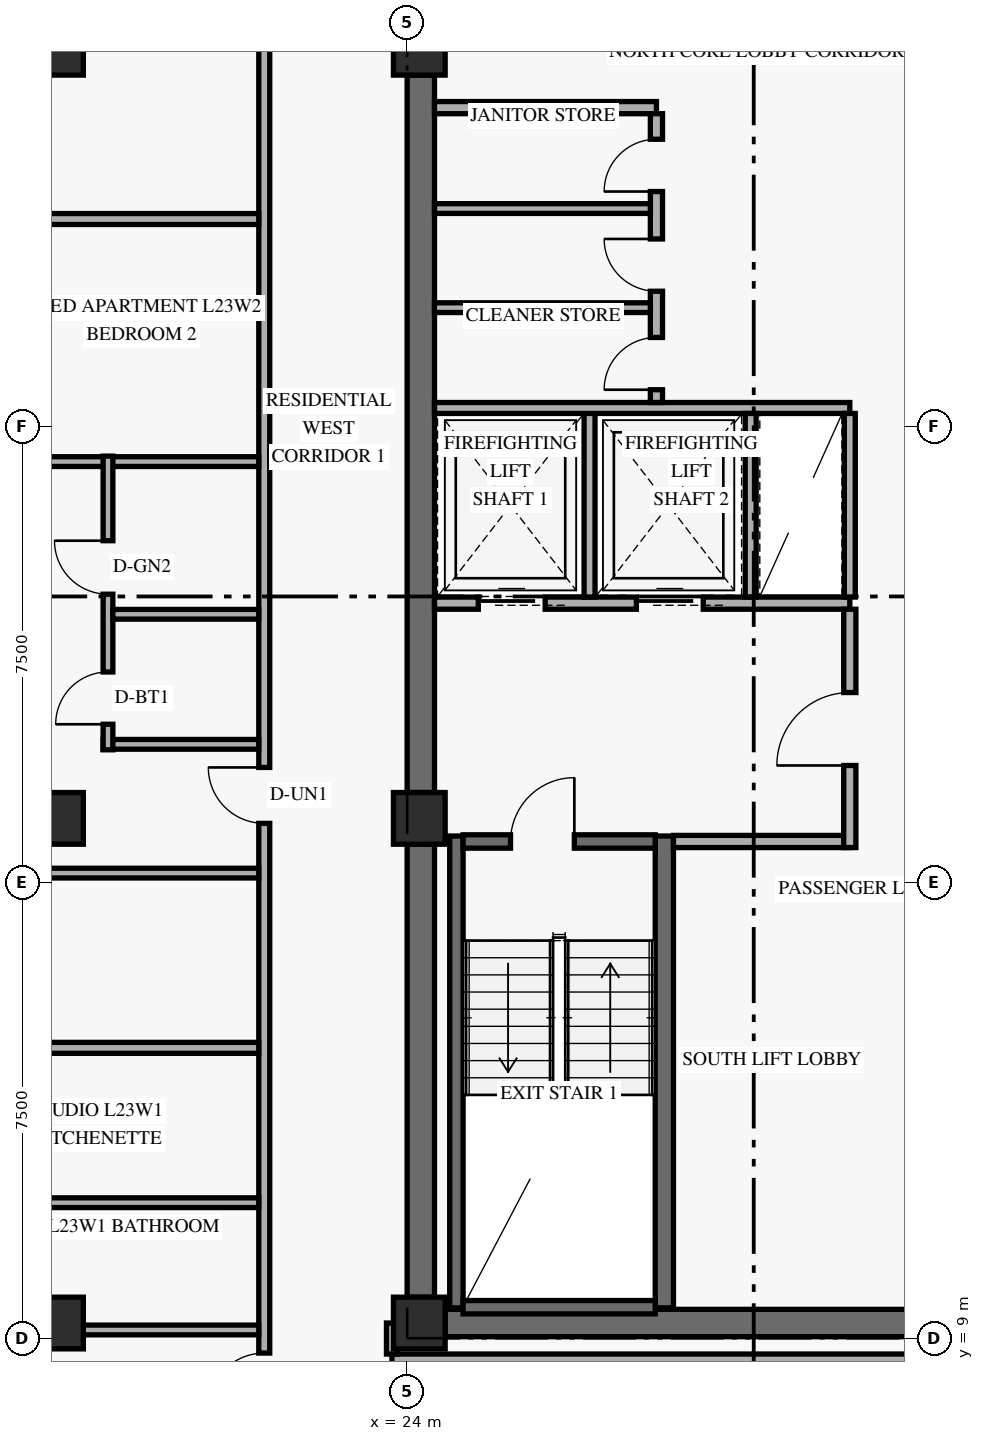
"""IFC4 building model, lengths in metres.
Left out: names, types, materials, properties, quantities, classifications, styles, units other than length and angle.
Written with IfcOpenShell. Run it as: python <this file> out.ifc"""

import sys

from ifc_helpers import new_model, si_unit, direction, frame, frame_2d, origin, origin_2d, place, context, subcontext, project, spatial, rectangle, extrude, element, fill, save


model = new_model("IFC4")
c1 = context("Model", 3, precision=1e-05, world=origin(), true_north=direction((0.0, 1.0)))
c2 = subcontext(c1, "Body", "Model", "MODEL_VIEW")
j1 = project(units=[si_unit("LENGTHUNIT", "METRE"), si_unit("PLANEANGLEUNIT", "RADIAN")], contexts=[c1])
p1 = place(None, origin())
s1 = spatial("IfcSite", under=j1, at=p1, CompositionType="ELEMENT")
p2 = place(p1, origin())
s2 = spatial("IfcBuilding", under=s1, at=p2, CompositionType="ELEMENT")
p3 = place(p2, frame((0.0, 0.0, 91.2)))
s3 = spatial("IfcBuildingStorey", under=s2, at=p3, CompositionType="ELEMENT", Elevation=91.2)
p4 = place(p3, frame((24.225, 9.675, 0.0), z_axis=(0.0, 0.0, 1.0), x_axis=(0.0, 1.0, 0.0)))
e1 = element("IfcWall", 1, at=p4, inside=s3, PredefinedType="SHEAR", context=c2, shape_type="SweptSolid", body=[
    extrude(rectangle(XDim=7.45, YDim=0.45, at=frame_2d((3.725, 0.0))), origin(), (0.0, 0.0, 1.0), 2.749),
])
p5 = place(p3, frame((24.225, 17.975, 0.0), z_axis=(0.0, 0.0, 1.0), x_axis=(0.0, 1.0, 0.0)))
e2 = element("IfcWall", 2, at=p5, inside=s3, PredefinedType="SHEAR", context=c2, shape_type="SweptSolid", body=[
    extrude(rectangle(XDim=11.8, YDim=0.45, at=frame_2d((5.9, 0.0))), origin(), (0.0, 0.0, 1.0), 2.749),
])
p6 = place(p3, frame((24.625, 9.25, 0.0), z_axis=(0.0, 0.0, 1.0), x_axis=(1.0, 0.0, 0.0)))
e3 = element("IfcWall", 3, at=p6, inside=s3, PredefinedType="SHEAR", context=c2, shape_type="SweptSolid", body=[
    extrude(rectangle(XDim=10.15, YDim=0.45, at=frame_2d((5.075, 0.0))), origin(), (0.0, 0.0, 1.0), 3.36),
])
p7 = place(p3, frame((24.81, 9.5, 0.0), z_axis=(0.0, 0.0, 1.0), x_axis=(0.0, 1.0, 0.0)))
e4 = element("IfcWall", 4, at=p7, inside=s3, PredefinedType="SHEAR", context=c2, shape_type="SweptSolid", body=[
    extrude(rectangle(XDim=7.76, YDim=0.22, at=frame_2d((3.88, 0.0))), origin(), (0.0, 0.0, 1.0), 3.36),
])
p8 = place(p3, frame((28.23, 9.5, 0.0), z_axis=(0.0, 0.0, 1.0), x_axis=(0.0, 1.0, 0.0)))
e5 = element("IfcWall", 5, at=p8, inside=s3, PredefinedType="SHEAR", context=c2, shape_type="SweptSolid", body=[
    extrude(rectangle(XDim=7.76, YDim=0.3, at=frame_2d((3.88, 0.0))), origin(), (0.0, 0.0, 1.0), 3.36),
])
p9 = place(p3, frame((24.92, 9.51, 0.0), z_axis=(0.0, 0.0, 1.0), x_axis=(1.0, 0.0, 0.0)))
e6 = element("IfcWall", 6, at=p9, inside=s3, PredefinedType="SHEAR", context=c2, shape_type="SweptSolid", body=[
    extrude(rectangle(XDim=3.16, YDim=0.22, at=frame_2d((1.58, 0.0))), origin(), (0.0, 0.0, 1.0), 3.36),
])
p10 = place(p3, frame((24.92, 17.17, 0.0), z_axis=(0.0, 0.0, 1.0), x_axis=(1.0, 0.0, 0.0)))
e7 = element("IfcWall", 7, at=p10, inside=s3, PredefinedType="SHEAR", context=c2, shape_type="SweptSolid", body=[
    extrude(rectangle(XDim=3.16, YDim=0.22, at=frame_2d((1.58, 0.0))), origin(), (0.0, 0.0, 1.0), 3.36),
])
p11 = place(p10, frame((0.78, 0.0, 0.0)))
e8 = element("IfcOpeningElement", 8, at=p11, cuts=e7, PredefinedType="OPENING", context=c2, shape_type="SweptSolid", body=[
    extrude(rectangle(XDim=1.05, YDim=2.15, at=frame_2d((0.525, 1.075))), frame((0.0, 0.12, 0.0), z_axis=(0.0, -1.0, 0.0), x_axis=(1.0, 0.0, 0.0)), (0.0, 0.0, 1.0), 0.24),
])
for number, where, z_axis, x_axis in (
    (9, (18.25, 9.25, 0.0), (0.0, 0.0, 1.0), (1.0, 0.0, 0.0)),
    (10, (18.25, 17.55, 0.0), (0.0, 0.0, 1.0), (1.0, 0.0, 0.0)),
    (11, (18.25, 30.2, 0.0), (0.0, 0.0, 1.0), (1.0, 0.0, 0.0)),
    (12, (24.2, 9.25, 0.0), (0.0, 0.0, 1.0), (1.0, 0.0, 0.0)),
    (13, (24.2, 17.55, 0.0), (0.0, 0.0, 1.0), (1.0, 0.0, 0.0)),
    (14, (24.2, 30.2, 0.0), (0.0, 0.0, 1.0), (1.0, 0.0, 0.0)),
):
    element("IfcColumn", number, at=place(p3, frame(where, z_axis=z_axis, x_axis=x_axis)), inside=s3, PredefinedType="COLUMN", context=c2, shape_type="SweptSolid", body=[
        extrude(rectangle(XDim=0.85, YDim=0.85, at=origin_2d()), origin(), (0.0, 0.0, 1.0), 3.6),
    ])
p12 = place(p3, frame((24.45, 21.09, 0.0), z_axis=(0.0, 0.0, 1.0), x_axis=(1.0, 0.0, 0.0)))
e15 = element("IfcWall", 15, at=p12, inside=s3, PredefinedType="STANDARD", context=c2, shape_type="SweptSolid", body=[
    extrude(rectangle(XDim=6.83, YDim=0.2, at=frame_2d((3.415, 0.0))), origin(), (0.0, 0.0, 1.0), 3.36),
])
p13 = place(p12, frame((0.72, 0.0, 0.0)))
e16 = element("IfcOpeningElement", 16, at=p13, cuts=e15, PredefinedType="OPENING", context=c2, shape_type="SweptSolid", body=[
    extrude(rectangle(XDim=1.1, YDim=2.2, at=frame_2d((0.55, 1.1))), frame((0.0, 0.11, 0.0), z_axis=(0.0, -1.0, 0.0), x_axis=(1.0, 0.0, 0.0)), (0.0, 0.0, 1.0), 0.22),
])
p14 = place(p12, frame((3.32, 0.0, 0.0)))
e17 = element("IfcOpeningElement", 17, at=p14, cuts=e15, PredefinedType="OPENING", context=c2, shape_type="SweptSolid", body=[
    extrude(rectangle(XDim=1.1, YDim=2.2, at=frame_2d((0.55, 1.1))), frame((0.0, 0.11, 0.0), z_axis=(0.0, -1.0, 0.0), x_axis=(1.0, 0.0, 0.0)), (0.0, 0.0, 1.0), 0.22),
])
p15 = place(p3, frame((28.38, 17.17, 0.0), z_axis=(0.0, 0.0, 1.0), x_axis=(1.0, 0.0, 0.0)))
e18 = element("IfcWall", 18, at=p15, inside=s3, PredefinedType="STANDARD", context=c2, shape_type="SweptSolid", body=[
    extrude(rectangle(XDim=2.9, YDim=0.2, at=frame_2d((1.45, 0.0))), origin(), (0.0, 0.0, 1.0), 3.36),
])
p16 = place(p3, frame((31.28, 17.07, 0.0), z_axis=(0.0, 0.0, 1.0), x_axis=(0.0, 1.0, 0.0)))
e19 = element("IfcWall", 19, at=p16, inside=s3, PredefinedType="STANDARD", context=c2, shape_type="SweptSolid", body=[
    extrude(rectangle(XDim=3.92, YDim=0.2, at=frame_2d((1.96, 0.0))), origin(), (0.0, 0.0, 1.0), 2.731),
])
p17 = place(p16, frame((1.35, 0.0, 0.0)))
e20 = element("IfcOpeningElement", 20, at=p17, cuts=e19, PredefinedType="OPENING", context=c2, shape_type="SweptSolid", body=[
    extrude(rectangle(XDim=1.2, YDim=2.15, at=frame_2d((0.6, 1.075))), frame((0.0, 0.11, 0.0), z_axis=(0.0, -1.0, 0.0), x_axis=(1.0, 0.0, 0.0)), (0.0, 0.0, 1.0), 0.22),
])
p18 = place(p3, frame((27.0, 21.19, 0.0), z_axis=(0.0, 0.0, 1.0), x_axis=(0.0, 1.0, 0.0)))
e21 = element("IfcWall", 21, at=p18, inside=s3, PredefinedType="STANDARD", context=c2, shape_type="SweptSolid", body=[
    extrude(rectangle(XDim=3.11, YDim=0.18, at=frame_2d((1.555, 0.0))), origin(), (0.0, 0.0, 1.0), 3.36),
])
p19 = place(p3, frame((24.45, 24.3, 0.0), z_axis=(0.0, 0.0, 1.0), x_axis=(1.0, 0.0, 0.0)))
e22 = element("IfcWall", 22, at=p19, inside=s3, PredefinedType="STANDARD", context=c2, shape_type="SweptSolid", body=[
    extrude(rectangle(XDim=6.83, YDim=0.18, at=frame_2d((3.415, 0.0))), origin(), (0.0, 0.0, 1.0), 3.36),
])
for number, where, z_axis, x_axis in (
    (23, (29.65, 21.19, 0.0), (0.0, 0.0, 1.0), (0.0, 1.0, 0.0)),
    (24, (31.28, 21.19, 0.0), (0.0, 0.0, 1.0), (0.0, 1.0, 0.0)),
):
    element("IfcWall", number, at=place(p3, frame(where, z_axis=z_axis, x_axis=x_axis)), inside=s3, PredefinedType="STANDARD", context=c2, shape_type="SweptSolid", body=[
        extrude(rectangle(XDim=3.02, YDim=0.18, at=frame_2d((1.51, 0.0))), origin(), (0.0, 0.0, 1.0), 3.36),
    ])
p20 = place(p3, frame((24.45, 29.24, 0.0), z_axis=(0.0, 0.0, 1.0), x_axis=(1.0, 0.0, 0.0)))
e25 = element("IfcWall", 25, at=p20, inside=s3, PredefinedType="STANDARD", context=c2, shape_type="SweptSolid", body=[
    extrude(rectangle(XDim=3.65, YDim=0.2, at=frame_2d((1.825, 0.0))), origin(), (0.0, 0.0, 1.0), 3.36),
])
p21 = place(p3, frame((28.1, 24.39, 0.0), z_axis=(0.0, 0.0, 1.0), x_axis=(0.0, 1.0, 0.0)))
e26 = element("IfcWall", 26, at=p21, inside=s3, PredefinedType="STANDARD", context=c2, shape_type="SweptSolid", body=[
    extrude(rectangle(XDim=4.75, YDim=0.2, at=frame_2d((2.375, 0.0))), origin(), (0.0, 0.0, 1.0), 3.36),
])
p22 = place(p21, frame((0.21, 0.0, 0.0)))
e27 = element("IfcOpeningElement", 27, at=p22, cuts=e26, PredefinedType="OPENING", context=c2, shape_type="SweptSolid", body=[
    extrude(rectangle(XDim=0.86, YDim=2.1, at=frame_2d((0.43, 1.05))), frame((0.0, 0.11, 0.0), z_axis=(0.0, -1.0, 0.0), x_axis=(1.0, 0.0, 0.0)), (0.0, 0.0, 1.0), 0.22),
])
p23 = place(p21, frame((1.83, 0.0, 0.0)))
e28 = element("IfcOpeningElement", 28, at=p23, cuts=e26, PredefinedType="OPENING", context=c2, shape_type="SweptSolid", body=[
    extrude(rectangle(XDim=0.86, YDim=2.1, at=frame_2d((0.43, 1.05))), frame((0.0, 0.11, 0.0), z_axis=(0.0, -1.0, 0.0), x_axis=(1.0, 0.0, 0.0)), (0.0, 0.0, 1.0), 0.22),
])
p24 = place(p21, frame((3.47, 0.0, 0.0)))
e29 = element("IfcOpeningElement", 29, at=p24, cuts=e26, PredefinedType="OPENING", context=c2, shape_type="SweptSolid", body=[
    extrude(rectangle(XDim=0.86, YDim=2.1, at=frame_2d((0.43, 1.05))), frame((0.0, 0.11, 0.0), z_axis=(0.0, -1.0, 0.0), x_axis=(1.0, 0.0, 0.0)), (0.0, 0.0, 1.0), 0.22),
])
for number, where, z_axis, x_axis in (
    (30, (24.45, 25.95, 0.0), (0.0, 0.0, 1.0), (1.0, 0.0, 0.0)),
    (31, (24.45, 27.58, 0.0), (0.0, 0.0, 1.0), (1.0, 0.0, 0.0)),
):
    element("IfcWall", number, at=place(p3, frame(where, z_axis=z_axis, x_axis=x_axis)), inside=s3, PredefinedType="PARTITIONING", context=c2, shape_type="SweptSolid", body=[
        extrude(rectangle(XDim=3.55, YDim=0.16, at=frame_2d((1.775, 0.0))), origin(), (0.0, 0.0, 1.0), 3.36),
    ])
p25 = place(p3, frame((21.65, 2.98, 0.0), z_axis=(0.0, 0.0, 1.0), x_axis=(0.0, 1.0, 0.0)))
e32 = element("IfcWall", 32, at=p25, inside=s3, PredefinedType="STANDARD", context=c2, shape_type="SweptSolid", body=[
    extrude(rectangle(XDim=42.04, YDim=0.18, at=frame_2d((21.02, 0.0))), origin(), (0.0, 0.0, 1.0), 2.731),
])
p26 = place(p25, frame((4.856, 0.0, 0.0)))
e33 = element("IfcOpeningElement", 33, at=p26, cuts=e32, PredefinedType="OPENING", context=c2, shape_type="SweptSolid", body=[
    extrude(rectangle(XDim=0.92, YDim=2.15, at=frame_2d((0.46, 1.075))), frame((0.0, 0.1, 0.0), z_axis=(0.0, -1.0, 0.0), x_axis=(1.0, 0.0, 0.0)), (0.0, 0.0, 1.0), 0.2),
])
p27 = place(p25, frame((14.488, 0.0, 0.0)))
e34 = element("IfcOpeningElement", 34, at=p27, cuts=e32, PredefinedType="OPENING", context=c2, shape_type="SweptSolid", body=[
    extrude(rectangle(XDim=0.92, YDim=2.15, at=frame_2d((0.46, 1.075))), frame((0.0, 0.1, 0.0), z_axis=(0.0, -1.0, 0.0), x_axis=(1.0, 0.0, 0.0)), (0.0, 0.0, 1.0), 0.2),
])
p28 = place(p25, frame((32.552, 0.0, 0.0)))
e35 = element("IfcOpeningElement", 35, at=p28, cuts=e32, PredefinedType="OPENING", context=c2, shape_type="SweptSolid", body=[
    extrude(rectangle(XDim=0.92, YDim=2.15, at=frame_2d((0.46, 1.075))), frame((0.0, 0.1, 0.0), z_axis=(0.0, -1.0, 0.0), x_axis=(1.0, 0.0, 0.0)), (0.0, 0.0, 1.0), 0.2),
])
p29 = place(p3, frame((23.75, 8.65, 0.0), z_axis=(0.0, 0.0, 1.0), x_axis=(1.0, 0.0, 0.0)))
e36 = element("IfcWall", 36, at=p29, inside=s3, PredefinedType="STANDARD", context=c2, shape_type="SweptSolid", body=[
    extrude(rectangle(XDim=11.67, YDim=0.18, at=frame_2d((5.835, 0.0))), origin(), (0.0, 0.0, 1.0), 2.731),
])
p30 = place(p3, frame((23.75, 8.74, 0.0), z_axis=(0.0, 0.0, 1.0), x_axis=(0.0, 1.0, 0.0)))
e37 = element("IfcWall", 37, at=p30, inside=s3, PredefinedType="STANDARD", context=c2, shape_type="SweptSolid", body=[
    extrude(rectangle(XDim=0.51, YDim=0.18, at=frame_2d((0.255, 0.0))), origin(), (0.0, 0.0, 1.0), 2.731),
])
p31 = place(p3, frame((16.03, 9.136, 0.0), z_axis=(0.0, 0.0, 1.0), x_axis=(1.0, 0.0, 0.0)))
e38 = element("IfcWall", 38, at=p31, inside=s3, PredefinedType="PLUMBINGWALL", context=c2, shape_type="SweptSolid", body=[
    extrude(rectangle(XDim=5.53, YDim=0.16, at=frame_2d((2.765, 0.0))), origin(), (0.0, 0.0, 1.0), 2.731),
])
p32 = place(p3, frame((16.19, 11.229, 0.0), z_axis=(0.0, 0.0, 1.0), x_axis=(1.0, 0.0, 0.0)))
e39 = element("IfcWall", 39, at=p32, inside=s3, PredefinedType="PLUMBINGWALL", context=c2, shape_type="SweptSolid", body=[
    extrude(rectangle(XDim=5.37, YDim=0.16, at=frame_2d((2.685, 0.0))), origin(), (0.0, 0.0, 1.0), 2.731),
])
p33 = place(p3, frame((10.08, 13.776, 0.0), z_axis=(0.0, 0.0, 1.0), x_axis=(1.0, 0.0, 0.0)))
e40 = element("IfcWall", 40, at=p33, inside=s3, PredefinedType="PARTITIONING", context=c2, shape_type="SweptSolid", body=[
    extrude(rectangle(XDim=11.48, YDim=0.18, at=frame_2d((5.74, 0.0))), origin(), (0.0, 0.0, 1.0), 2.731),
])
p34 = place(p3, frame((10.08, 23.418, 0.0), z_axis=(0.0, 0.0, 1.0), x_axis=(1.0, 0.0, 0.0)))
e41 = element("IfcWall", 41, at=p34, inside=s3, PredefinedType="PARTITIONING", context=c2, shape_type="SweptSolid", body=[
    extrude(rectangle(XDim=11.48, YDim=0.16, at=frame_2d((5.74, 0.0))), origin(), (0.0, 0.0, 1.0), 2.731),
])
p35 = place(p34, frame((2.52, 0.0, 0.0)))
e42 = element("IfcOpeningElement", 42, at=p35, cuts=e41, PredefinedType="OPENING", context=c2, shape_type="SweptSolid", body=[
    extrude(rectangle(XDim=0.88, YDim=2.14, at=frame_2d((0.44, 1.07))), frame((0.0, 0.09, 0.0), z_axis=(0.0, -1.0, 0.0), x_axis=(1.0, 0.0, 0.0)), (0.0, 0.0, 1.0), 0.18),
])
p36 = place(p34, frame((7.085, 0.0, 0.0)))
e43 = element("IfcOpeningElement", 43, at=p36, cuts=e41, PredefinedType="OPENING", context=c2, shape_type="SweptSolid", body=[
    extrude(rectangle(XDim=0.88, YDim=2.14, at=frame_2d((0.44, 1.07))), frame((0.0, 0.09, 0.0), z_axis=(0.0, -1.0, 0.0), x_axis=(1.0, 0.0, 0.0)), (0.0, 0.0, 1.0), 0.18),
])
p37 = place(p3, frame((19.0, 18.768, 0.0), z_axis=(0.0, 0.0, 1.0), x_axis=(1.0, 0.0, 0.0)))
e44 = element("IfcWall", 44, at=p37, inside=s3, PredefinedType="PLUMBINGWALL", context=c2, shape_type="SweptSolid", body=[
    extrude(rectangle(XDim=2.56, YDim=0.16, at=frame_2d((1.28, 0.0))), origin(), (0.0, 0.0, 1.0), 3.36),
])
p38 = place(p3, frame((19.08, 18.678, 0.0), z_axis=(0.0, 0.0, 1.0), x_axis=(0.0, 1.0, 0.0)))
e45 = element("IfcWall", 45, at=p38, inside=s3, PredefinedType="PLUMBINGWALL", context=c2, shape_type="SweptSolid", body=[
    extrude(rectangle(XDim=4.83, YDim=0.16, at=frame_2d((2.415, 0.0))), origin(), (0.0, 0.0, 1.0), 3.36),
])
p39 = place(p38, frame((0.42, 0.0, 0.0)))
e46 = element("IfcOpeningElement", 46, at=p39, cuts=e45, PredefinedType="OPENING", context=c2, shape_type="SweptSolid", body=[
    extrude(rectangle(XDim=0.86, YDim=2.12, at=frame_2d((0.43, 1.06))), frame((0.0, 0.09, 0.0), z_axis=(0.0, -1.0, 0.0), x_axis=(1.0, 0.0, 0.0)), (0.0, 0.0, 1.0), 0.18),
])
p40 = place(p38, frame((2.559, 0.0, 0.0)))
e47 = element("IfcOpeningElement", 47, at=p40, cuts=e45, PredefinedType="OPENING", context=c2, shape_type="SweptSolid", body=[
    extrude(rectangle(XDim=0.88, YDim=2.12, at=frame_2d((0.44, 1.06))), frame((0.0, 0.09, 0.0), z_axis=(0.0, -1.0, 0.0), x_axis=(1.0, 0.0, 0.0)), (0.0, 0.0, 1.0), 0.18),
])
p41 = place(p3, frame((19.16, 20.907, 0.0), z_axis=(0.0, 0.0, 1.0), x_axis=(1.0, 0.0, 0.0)))
e48 = element("IfcWall", 48, at=p41, inside=s3, PredefinedType="PLUMBINGWALL", context=c2, shape_type="SweptSolid", body=[
    extrude(rectangle(XDim=2.4, YDim=0.16, at=frame_2d((1.2, 0.0))), origin(), (0.0, 0.0, 1.0), 3.36),
])
p42 = place(p3, frame((10.08, 16.65, 0.0), z_axis=(0.0, 0.0, 1.0), x_axis=(1.0, 0.0, 0.0)))
e49 = element("IfcWall", 49, at=p42, inside=s3, PredefinedType="PARTITIONING", context=c2, shape_type="SweptSolid", body=[
    extrude(rectangle(XDim=11.48, YDim=0.16, at=frame_2d((5.74, 0.0))), origin(), (0.0, 0.0, 1.0), 2.731),
])
p43 = place(p42, frame((5.195, 0.0, 0.0)))
e50 = element("IfcOpeningElement", 50, at=p43, cuts=e49, PredefinedType="OPENING", context=c2, shape_type="SweptSolid", body=[
    extrude(rectangle(XDim=0.95, YDim=2.15, at=frame_2d((0.475, 1.075))), frame((0.0, 0.09, 0.0), z_axis=(0.0, -1.0, 0.0), x_axis=(1.0, 0.0, 0.0)), (0.0, 0.0, 1.0), 0.18),
])
p44 = place(p3, frame((10.08, 27.408, 0.0), z_axis=(0.0, 0.0, 1.0), x_axis=(1.0, 0.0, 0.0)))
e51 = element("IfcWall", 51, at=p44, inside=s3, PredefinedType="PARTITIONING", context=c2, shape_type="SweptSolid", body=[
    extrude(rectangle(XDim=11.48, YDim=0.18, at=frame_2d((5.74, 0.0))), origin(), (0.0, 0.0, 1.0), 2.731),
])
p45 = place(p11, frame((1.05, 0.0, 0.0), z_axis=(0.0, 0.0, 1.0), x_axis=(-1.0, 0.0, 0.0)))
e52 = element("IfcDoor", 52, at=p45, inside=s3, OperationType="SINGLE_SWING_LEFT", PredefinedType="DOOR", context=c2, shape_type="SweptSolid", body=[
    extrude(rectangle(XDim=1.05, YDim=2.15, at=frame_2d((0.525, 1.075))), frame((0.0, 0.025, 0.0), z_axis=(0.0, -1.0, 0.0), x_axis=(1.0, 0.0, 0.0)), (0.0, 0.0, 1.0), 0.05),
])
fill(e8, e52)
p46 = place(p13, origin())
e53 = element("IfcDoor", 53, at=p46, inside=s3, OperationType="SLIDING_TO_LEFT", PredefinedType="DOOR", context=c2, shape_type="SweptSolid", body=[
    extrude(rectangle(XDim=1.1, YDim=2.2, at=frame_2d((0.55, 1.1))), frame((0.0, 0.025, 0.0), z_axis=(0.0, -1.0, 0.0), x_axis=(1.0, 0.0, 0.0)), (0.0, 0.0, 1.0), 0.05),
])
fill(e16, e53)
p47 = place(p14, origin())
e54 = element("IfcDoor", 54, at=p47, inside=s3, OperationType="SLIDING_TO_LEFT", PredefinedType="DOOR", context=c2, shape_type="SweptSolid", body=[
    extrude(rectangle(XDim=1.1, YDim=2.2, at=frame_2d((0.55, 1.1))), frame((0.0, 0.025, 0.0), z_axis=(0.0, -1.0, 0.0), x_axis=(1.0, 0.0, 0.0)), (0.0, 0.0, 1.0), 0.05),
])
fill(e17, e54)
p48 = place(p17, origin())
e55 = element("IfcDoor", 55, at=p48, inside=s3, OperationType="SINGLE_SWING_LEFT", PredefinedType="DOOR", context=c2, shape_type="SweptSolid", body=[
    extrude(rectangle(XDim=1.2, YDim=2.15, at=frame_2d((0.6, 1.075))), frame((0.0, 0.025, 0.0), z_axis=(0.0, -1.0, 0.0), x_axis=(1.0, 0.0, 0.0)), (0.0, 0.0, 1.0), 0.05),
])
fill(e20, e55)
p49 = place(p22, origin())
e56 = element("IfcDoor", 56, at=p49, inside=s3, OperationType="SINGLE_SWING_LEFT", PredefinedType="DOOR", context=c2, shape_type="SweptSolid", body=[
    extrude(rectangle(XDim=0.86, YDim=2.1, at=frame_2d((0.43, 1.05))), frame((0.0, 0.025, 0.0), z_axis=(0.0, -1.0, 0.0), x_axis=(1.0, 0.0, 0.0)), (0.0, 0.0, 1.0), 0.05),
])
fill(e27, e56)
p50 = place(p23, origin())
e57 = element("IfcDoor", 57, at=p50, inside=s3, OperationType="SINGLE_SWING_RIGHT", PredefinedType="DOOR", context=c2, shape_type="SweptSolid", body=[
    extrude(rectangle(XDim=0.86, YDim=2.1, at=frame_2d((0.43, 1.05))), frame((0.0, 0.025, 0.0), z_axis=(0.0, -1.0, 0.0), x_axis=(1.0, 0.0, 0.0)), (0.0, 0.0, 1.0), 0.05),
])
fill(e28, e57)
p51 = place(p24, origin())
e58 = element("IfcDoor", 58, at=p51, inside=s3, OperationType="SINGLE_SWING_LEFT", PredefinedType="DOOR", context=c2, shape_type="SweptSolid", body=[
    extrude(rectangle(XDim=0.86, YDim=2.1, at=frame_2d((0.43, 1.05))), frame((0.0, 0.025, 0.0), z_axis=(0.0, -1.0, 0.0), x_axis=(1.0, 0.0, 0.0)), (0.0, 0.0, 1.0), 0.05),
])
fill(e29, e58)
p52 = place(p26, origin())
e59 = element("IfcDoor", 59, at=p52, inside=s3, OperationType="SINGLE_SWING_LEFT", PredefinedType="DOOR", context=c2, shape_type="SweptSolid", body=[
    extrude(rectangle(XDim=0.92, YDim=2.15, at=frame_2d((0.46, 1.075))), frame((0.0, 0.025, 0.0), z_axis=(0.0, -1.0, 0.0), x_axis=(1.0, 0.0, 0.0)), (0.0, 0.0, 1.0), 0.05),
])
fill(e33, e59)
p53 = place(p27, origin())
e60 = element("IfcDoor", 60, at=p53, inside=s3, OperationType="SINGLE_SWING_RIGHT", PredefinedType="DOOR", context=c2, shape_type="SweptSolid", body=[
    extrude(rectangle(XDim=0.92, YDim=2.15, at=frame_2d((0.46, 1.075))), frame((0.0, 0.025, 0.0), z_axis=(0.0, -1.0, 0.0), x_axis=(1.0, 0.0, 0.0)), (0.0, 0.0, 1.0), 0.05),
])
fill(e34, e60)
p54 = place(p39, origin())
e61 = element("IfcDoor", 61, at=p54, inside=s3, OperationType="SINGLE_SWING_LEFT", PredefinedType="DOOR", context=c2, shape_type="SweptSolid", body=[
    extrude(rectangle(XDim=0.86, YDim=2.12, at=frame_2d((0.43, 1.06))), frame((0.0, 0.025, 0.0), z_axis=(0.0, -1.0, 0.0), x_axis=(1.0, 0.0, 0.0)), (0.0, 0.0, 1.0), 0.05),
])
fill(e46, e61)
p55 = place(p40, origin())
e62 = element("IfcDoor", 62, at=p55, inside=s3, OperationType="SINGLE_SWING_RIGHT", PredefinedType="DOOR", context=c2, shape_type="SweptSolid", body=[
    extrude(rectangle(XDim=0.88, YDim=2.12, at=frame_2d((0.44, 1.06))), frame((0.0, 0.025, 0.0), z_axis=(0.0, -1.0, 0.0), x_axis=(1.0, 0.0, 0.0)), (0.0, 0.0, 1.0), 0.05),
])
fill(e47, e62)
save(model, sys.argv[1])
